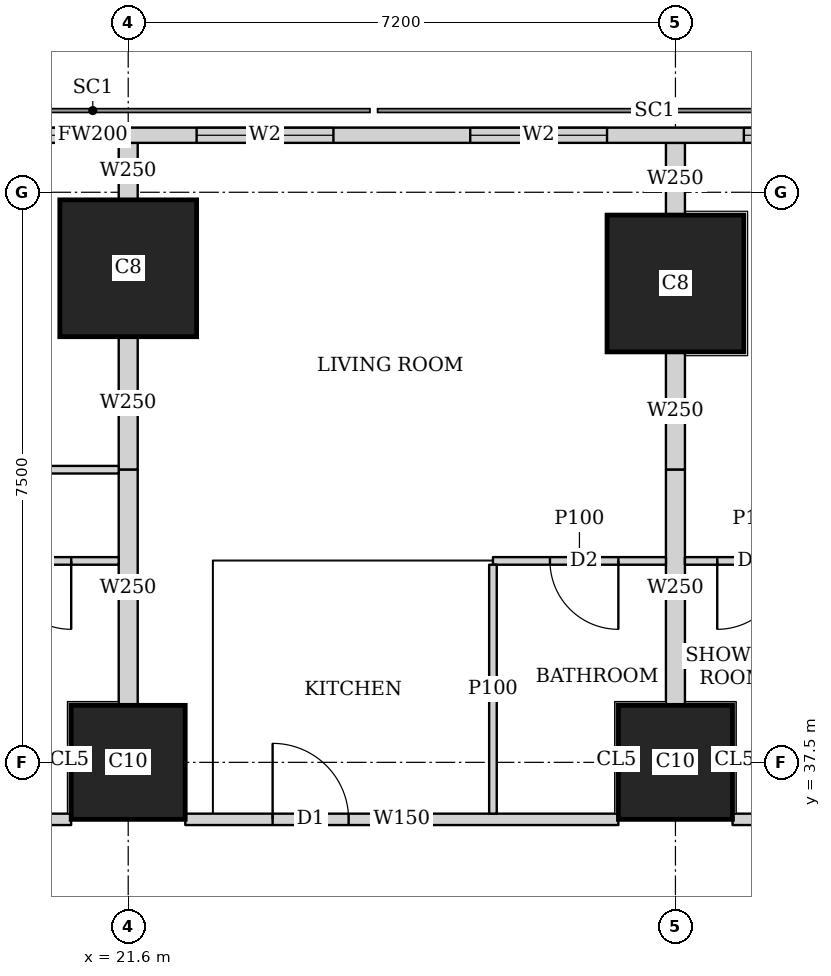
"""IFC4 building model, lengths in metres.
Left out: names, types, materials, properties, quantities, classifications, styles, units other than length and angle.
Written with IfcOpenShell. Run it as: python <this file> out.ifc"""

import sys

from ifc_helpers import new_model, si_unit, direction, frame, frame_2d, origin, origin_2d, place, context, subcontext, project, spatial, rectangle, extrude, element, fill, save


model = new_model("IFC4")
c1 = context("Model", 3, precision=1e-05, world=origin(), true_north=direction((0.0, 1.0)))
c2 = subcontext(c1, "Body", "Model", "MODEL_VIEW")
j1 = project(units=[si_unit("LENGTHUNIT", "METRE"), si_unit("PLANEANGLEUNIT", "RADIAN")], contexts=[c1])
p1 = place(None, origin())
s1 = spatial("IfcSite", under=j1, at=p1, CompositionType="ELEMENT")
p2 = place(p1, origin())
s2 = spatial("IfcBuilding", under=s1, at=p2, CompositionType="ELEMENT")
p3 = place(p2, frame((0.0, 0.0, 169.55)))
s3 = spatial("IfcBuildingStorey", under=s2, at=p3, CompositionType="ELEMENT", Elevation=169.55)
for number, where, z_axis, x_axis in (
    (1, (21.6, 37.5, 0.0), (0.0, 0.0, 1.0), (1.0, 0.0, 0.0)),
    (2, (28.8, 37.5, 0.0), (0.0, 0.0, 1.0), (1.0, 0.0, 0.0)),
):
    element("IfcColumn", number, at=place(p3, frame(where, z_axis=z_axis, x_axis=x_axis)), inside=s3, PredefinedType="COLUMN", context=c2, shape_type="SweptSolid", body=[
        extrude(rectangle(XDim=1.5, YDim=1.5, at=origin_2d()), origin(), (0.0, 0.0, 1.0), 3.75),
    ])
for number, where, z_axis, x_axis in (
    (3, (21.6, 44.0, 0.0), (0.0, 0.0, 1.0), (1.0, 0.0, 0.0)),
    (4, (28.8, 43.8, 0.0), (0.0, 0.0, 1.0), (1.0, 0.0, 0.0)),
):
    element("IfcColumn", number, at=place(p3, frame(where, z_axis=z_axis, x_axis=x_axis)), inside=s3, PredefinedType="COLUMN", context=c2, shape_type="SweptSolid", body=[
        extrude(rectangle(XDim=1.8, YDim=1.8, at=origin_2d()), origin(), (0.0, 0.0, 1.0), 3.75),
    ])
p4 = place(p3, frame((40.106, 45.75, 0.0), z_axis=(0.0, 0.0, 1.0), x_axis=(-1.0, 0.0, 0.0)))
e5 = element("IfcWall", 5, at=p4, inside=s3, PredefinedType="SOLIDWALL", context=c2, shape_type="SweptSolid", body=[
    extrude(rectangle(XDim=37.943, YDim=0.2, at=frame_2d((18.971, 0.0))), origin(), (0.0, 0.0, 1.0), 3.5),
])
p5 = place(p4, frame((8.606, 0.0, 0.9)))
e6 = element("IfcOpeningElement", 6, at=p5, cuts=e5, PredefinedType="OPENING", context=c2, shape_type="SweptSolid", body=[
    extrude(rectangle(XDim=1.8, YDim=1.5, at=frame_2d((0.9, 0.75))), frame((0.0, 0.11, 0.0), z_axis=(0.0, -1.0, 0.0), x_axis=(1.0, 0.0, 0.0)), (0.0, 0.0, 1.0), 0.22),
])
p6 = place(p4, frame((12.206, 0.0, 0.9)))
e7 = element("IfcOpeningElement", 7, at=p6, cuts=e5, PredefinedType="OPENING", context=c2, shape_type="SweptSolid", body=[
    extrude(rectangle(XDim=1.8, YDim=1.5, at=frame_2d((0.9, 0.75))), frame((0.0, 0.11, 0.0), z_axis=(0.0, -1.0, 0.0), x_axis=(1.0, 0.0, 0.0)), (0.0, 0.0, 1.0), 0.22),
])
p7 = place(p4, frame((15.806, 0.0, 0.9)))
e8 = element("IfcOpeningElement", 8, at=p7, cuts=e5, PredefinedType="OPENING", context=c2, shape_type="SweptSolid", body=[
    extrude(rectangle(XDim=1.8, YDim=1.5, at=frame_2d((0.9, 0.75))), frame((0.0, 0.11, 0.0), z_axis=(0.0, -1.0, 0.0), x_axis=(1.0, 0.0, 0.0)), (0.0, 0.0, 1.0), 0.22),
])
p8 = place(p4, frame((19.406, 0.0, 0.9)))
e9 = element("IfcOpeningElement", 9, at=p8, cuts=e5, PredefinedType="OPENING", context=c2, shape_type="SweptSolid", body=[
    extrude(rectangle(XDim=1.8, YDim=1.5, at=frame_2d((0.9, 0.75))), frame((0.0, 0.11, 0.0), z_axis=(0.0, -1.0, 0.0), x_axis=(1.0, 0.0, 0.0)), (0.0, 0.0, 1.0), 0.22),
])
p9 = place(p4, frame((23.006, 0.0, 0.9)))
e10 = element("IfcOpeningElement", 10, at=p9, cuts=e5, PredefinedType="OPENING", context=c2, shape_type="SweptSolid", body=[
    extrude(rectangle(XDim=1.8, YDim=1.5, at=frame_2d((0.9, 0.75))), frame((0.0, 0.11, 0.0), z_axis=(0.0, -1.0, 0.0), x_axis=(1.0, 0.0, 0.0)), (0.0, 0.0, 1.0), 0.22),
])
p10 = place(p4, frame((26.606, 0.0, 0.9)))
e11 = element("IfcOpeningElement", 11, at=p10, cuts=e5, PredefinedType="OPENING", context=c2, shape_type="SweptSolid", body=[
    extrude(rectangle(XDim=1.8, YDim=1.5, at=frame_2d((0.9, 0.75))), frame((0.0, 0.11, 0.0), z_axis=(0.0, -1.0, 0.0), x_axis=(1.0, 0.0, 0.0)), (0.0, 0.0, 1.0), 0.22),
])
p11 = place(p3, frame((15.151, 36.75, 0.0), z_axis=(0.0, 0.0, 1.0), x_axis=(1.0, 0.0, 0.0)))
e12 = element("IfcWall", 12, at=p11, inside=s3, PredefinedType="SOLIDWALL", context=c2, shape_type="SweptSolid", body=[
    extrude(rectangle(XDim=5.698, YDim=0.15, at=frame_2d((2.849, 0.0))), origin(), (0.0, 0.0, 1.0), 3.5),
])
p12 = place(p3, frame((22.351, 36.75, 0.0), z_axis=(0.0, 0.0, 1.0), x_axis=(1.0, 0.0, 0.0)))
e13 = element("IfcWall", 13, at=p12, inside=s3, PredefinedType="SOLIDWALL", context=c2, shape_type="SweptSolid", body=[
    extrude(rectangle(XDim=5.698, YDim=0.15, at=frame_2d((2.849, 0.0))), origin(), (0.0, 0.0, 1.0), 3.5),
])
p13 = place(p12, frame((1.149, 0.0, 0.0)))
e14 = element("IfcOpeningElement", 14, at=p13, cuts=e13, PredefinedType="OPENING", context=c2, shape_type="SweptSolid", body=[
    extrude(rectangle(XDim=1.0, YDim=2.1, at=frame_2d((0.5, 1.05))), frame((0.0, 0.085, 0.0), z_axis=(0.0, -1.0, 0.0), x_axis=(1.0, 0.0, 0.0)), (0.0, 0.0, 1.0), 0.17),
])
p14 = place(p3, frame((29.551, 36.75, 0.0), z_axis=(0.0, 0.0, 1.0), x_axis=(1.0, 0.0, 0.0)))
e15 = element("IfcWall", 15, at=p14, inside=s3, PredefinedType="SOLIDWALL", context=c2, shape_type="SweptSolid", body=[
    extrude(rectangle(XDim=5.422, YDim=0.15, at=frame_2d((2.711, 0.0))), origin(), (0.0, 0.0, 1.0), 3.5),
])
p15 = place(p14, frame((2.895, 0.0, 0.0)))
e16 = element("IfcOpeningElement", 16, at=p15, cuts=e15, PredefinedType="OPENING", context=c2, shape_type="SweptSolid", body=[
    extrude(rectangle(XDim=1.0, YDim=2.1, at=frame_2d((0.5, 1.05))), frame((0.0, 0.085, 0.0), z_axis=(0.0, -1.0, 0.0), x_axis=(1.0, 0.0, 0.0)), (0.0, 0.0, 1.0), 0.17),
])
p16 = place(p3, frame((14.4, 41.35, 0.0), z_axis=(0.0, 0.0, 1.0), x_axis=(1.0, 0.0, 0.0)))
e17 = element("IfcWall", 17, at=p16, inside=s3, PredefinedType="PARTITIONING", context=c2, shape_type="SweptSolid", body=[
    extrude(rectangle(XDim=7.075, YDim=0.1, at=frame_2d((3.538, 0.0))), origin(), (0.0, 0.0, 1.0), 3.5),
])
p17 = place(p16, frame((0.2, 0.0, 0.0)))
e18 = element("IfcOpeningElement", 18, at=p17, cuts=e17, PredefinedType="OPENING", context=c2, shape_type="SweptSolid", body=[
    extrude(rectangle(XDim=0.9, YDim=2.1, at=frame_2d((0.45, 1.05))), frame((0.0, 0.06, 0.0), z_axis=(0.0, -1.0, 0.0), x_axis=(1.0, 0.0, 0.0)), (0.0, 0.0, 1.0), 0.12),
])
p18 = place(p16, frame((3.8, 0.0, 0.0)))
e19 = element("IfcOpeningElement", 19, at=p18, cuts=e17, PredefinedType="OPENING", context=c2, shape_type="SweptSolid", body=[
    extrude(rectangle(XDim=0.9, YDim=2.1, at=frame_2d((0.45, 1.05))), frame((0.0, 0.06, 0.0), z_axis=(0.0, -1.0, 0.0), x_axis=(1.0, 0.0, 0.0)), (0.0, 0.0, 1.0), 0.12),
])
p19 = place(p3, frame((14.4, 40.15, 0.0), z_axis=(0.0, 0.0, 1.0), x_axis=(1.0, 0.0, 0.0)))
e20 = element("IfcWall", 20, at=p19, inside=s3, PredefinedType="PARTITIONING", context=c2, shape_type="SweptSolid", body=[
    extrude(rectangle(XDim=7.075, YDim=0.1, at=frame_2d((3.538, 0.0))), origin(), (0.0, 0.0, 1.0), 3.5),
])
p20 = place(p19, frame((0.655, 0.0, 0.0)))
e21 = element("IfcOpeningElement", 21, at=p20, cuts=e20, PredefinedType="OPENING", context=c2, shape_type="SweptSolid", body=[
    extrude(rectangle(XDim=0.9, YDim=2.1, at=frame_2d((0.45, 1.05))), frame((0.0, 0.06, 0.0), z_axis=(0.0, -1.0, 0.0), x_axis=(1.0, 0.0, 0.0)), (0.0, 0.0, 1.0), 0.12),
])
p21 = place(p19, frame((5.55, 0.0, 0.0)))
e22 = element("IfcOpeningElement", 22, at=p21, cuts=e20, PredefinedType="OPENING", context=c2, shape_type="SweptSolid", body=[
    extrude(rectangle(XDim=0.9, YDim=2.1, at=frame_2d((0.45, 1.05))), frame((0.0, 0.06, 0.0), z_axis=(0.0, -1.0, 0.0), x_axis=(1.0, 0.0, 0.0)), (0.0, 0.0, 1.0), 0.12),
])
p22 = place(p19, frame((3.054, 0.0, 0.0)))
e23 = element("IfcOpeningElement", 23, at=p22, cuts=e20, PredefinedType="OPENING", context=c2, shape_type="SweptSolid", body=[
    extrude(rectangle(XDim=0.9, YDim=2.1, at=frame_2d((0.45, 1.05))), frame((0.0, 0.06, 0.0), z_axis=(0.0, -1.0, 0.0), x_axis=(1.0, 0.0, 0.0)), (0.0, 0.0, 1.0), 0.12),
])
p23 = place(p3, frame((26.399, 40.15, 0.0), z_axis=(0.0, 0.0, 1.0), x_axis=(1.0, 0.0, 0.0)))
e24 = element("IfcWall", 24, at=p23, inside=s3, PredefinedType="PARTITIONING", context=c2, shape_type="SweptSolid", body=[
    extrude(rectangle(XDim=2.276, YDim=0.1, at=frame_2d((1.138, 0.0))), origin(), (0.0, 0.0, 1.0), 3.5),
])
p24 = place(p23, frame((0.75, 0.0, 0.0)))
e25 = element("IfcOpeningElement", 25, at=p24, cuts=e24, PredefinedType="OPENING", context=c2, shape_type="SweptSolid", body=[
    extrude(rectangle(XDim=0.9, YDim=2.1, at=frame_2d((0.45, 1.05))), frame((0.0, 0.06, 0.0), z_axis=(0.0, -1.0, 0.0), x_axis=(1.0, 0.0, 0.0)), (0.0, 0.0, 1.0), 0.12),
])
p25 = place(p3, frame((26.399, 36.825, 0.0), z_axis=(0.0, 0.0, 1.0), x_axis=(0.0, 1.0, 0.0)))
e26 = element("IfcWall", 26, at=p25, inside=s3, PredefinedType="PARTITIONING", context=c2, shape_type="SweptSolid", body=[
    extrude(rectangle(XDim=3.275, YDim=0.1, at=frame_2d((1.638, 0.0))), origin(), (0.0, 0.0, 1.0), 3.5),
])
p26 = place(p3, frame((21.6, 41.35, 0.0), z_axis=(0.0, 0.0, 1.0), x_axis=(0.0, 1.0, 0.0)))
e27 = element("IfcWall", 27, at=p26, inside=s3, PredefinedType="SOLIDWALL", context=c2, shape_type="SweptSolid", body=[
    extrude(rectangle(XDim=1.749, YDim=0.25, at=frame_2d((0.875, 0.0))), origin(), (0.0, 0.0, 1.0), 2.1),
])
p27 = place(p3, frame((21.6, 44.901, 0.0), z_axis=(0.0, 0.0, 1.0), x_axis=(0.0, 1.0, 0.0)))
e28 = element("IfcWall", 28, at=p27, inside=s3, PredefinedType="SOLIDWALL", context=c2, shape_type="SweptSolid", body=[
    extrude(rectangle(XDim=0.749, YDim=0.25, at=frame_2d((0.375, 0.0))), origin(), (0.0, 0.0, 1.0), 2.1),
])
p28 = place(p3, frame((21.6, 38.251, 0.0), z_axis=(0.0, 0.0, 1.0), x_axis=(0.0, 1.0, 0.0)))
e29 = element("IfcWall", 29, at=p28, inside=s3, PredefinedType="SOLIDWALL", context=c2, shape_type="SweptSolid", body=[
    extrude(rectangle(XDim=3.099, YDim=0.25, at=frame_2d((1.55, 0.0))), origin(), (0.0, 0.0, 1.0), 3.5),
])
p29 = place(p3, frame((28.925, 40.15, 0.0), z_axis=(0.0, 0.0, 1.0), x_axis=(1.0, 0.0, 0.0)))
e30 = element("IfcWall", 30, at=p29, inside=s3, PredefinedType="PARTITIONING", context=c2, shape_type="SweptSolid", body=[
    extrude(rectangle(XDim=1.904, YDim=0.1, at=frame_2d((0.952, 0.0))), origin(), (0.0, 0.0, 1.0), 3.5),
])
p30 = place(p29, frame((0.425, 0.0, 0.0)))
e31 = element("IfcOpeningElement", 31, at=p30, cuts=e30, PredefinedType="OPENING", context=c2, shape_type="SweptSolid", body=[
    extrude(rectangle(XDim=0.9, YDim=2.1, at=frame_2d((0.45, 1.05))), frame((0.0, 0.06, 0.0), z_axis=(0.0, -1.0, 0.0), x_axis=(1.0, 0.0, 0.0)), (0.0, 0.0, 1.0), 0.12),
])
p31 = place(p3, frame((28.8, 41.35, 0.0), z_axis=(0.0, 0.0, 1.0), x_axis=(0.0, 1.0, 0.0)))
e32 = element("IfcWall", 32, at=p31, inside=s3, PredefinedType="SOLIDWALL", context=c2, shape_type="SweptSolid", body=[
    extrude(rectangle(XDim=1.549, YDim=0.25, at=frame_2d((0.774, 0.0))), origin(), (0.0, 0.0, 1.0), 2.1),
])
p32 = place(p3, frame((28.8, 44.701, 0.0), z_axis=(0.0, 0.0, 1.0), x_axis=(0.0, 1.0, 0.0)))
e33 = element("IfcWall", 33, at=p32, inside=s3, PredefinedType="SOLIDWALL", context=c2, shape_type="SweptSolid", body=[
    extrude(rectangle(XDim=0.949, YDim=0.25, at=frame_2d((0.475, 0.0))), origin(), (0.0, 0.0, 1.0), 2.1),
])
p33 = place(p3, frame((28.8, 38.251, 0.0), z_axis=(0.0, 0.0, 1.0), x_axis=(0.0, 1.0, 0.0)))
e34 = element("IfcWall", 34, at=p33, inside=s3, PredefinedType="SOLIDWALL", context=c2, shape_type="SweptSolid", body=[
    extrude(rectangle(XDim=3.099, YDim=0.25, at=frame_2d((1.55, 0.0))), origin(), (0.0, 0.0, 1.0), 3.5),
])
p34 = place(p5, origin())
e35 = element("IfcWindow", 35, at=p34, inside=s3, PartitioningType="SINGLE_PANEL", PredefinedType="WINDOW", context=c2, shape_type="SweptSolid", body=[
    extrude(rectangle(XDim=1.8, YDim=1.5, at=frame_2d((0.9, 0.75))), frame((0.0, 0.03, 0.0), z_axis=(0.0, -1.0, 0.0), x_axis=(1.0, 0.0, 0.0)), (0.0, 0.0, 1.0), 0.06),
])
fill(e6, e35)
p35 = place(p6, origin())
e36 = element("IfcWindow", 36, at=p35, inside=s3, PartitioningType="SINGLE_PANEL", PredefinedType="WINDOW", context=c2, shape_type="SweptSolid", body=[
    extrude(rectangle(XDim=1.8, YDim=1.5, at=frame_2d((0.9, 0.75))), frame((0.0, 0.03, 0.0), z_axis=(0.0, -1.0, 0.0), x_axis=(1.0, 0.0, 0.0)), (0.0, 0.0, 1.0), 0.06),
])
fill(e7, e36)
p36 = place(p7, origin())
e37 = element("IfcWindow", 37, at=p36, inside=s3, PartitioningType="SINGLE_PANEL", PredefinedType="WINDOW", context=c2, shape_type="SweptSolid", body=[
    extrude(rectangle(XDim=1.8, YDim=1.5, at=frame_2d((0.9, 0.75))), frame((0.0, 0.03, 0.0), z_axis=(0.0, -1.0, 0.0), x_axis=(1.0, 0.0, 0.0)), (0.0, 0.0, 1.0), 0.06),
])
fill(e8, e37)
p37 = place(p8, origin())
e38 = element("IfcWindow", 38, at=p37, inside=s3, PartitioningType="SINGLE_PANEL", PredefinedType="WINDOW", context=c2, shape_type="SweptSolid", body=[
    extrude(rectangle(XDim=1.8, YDim=1.5, at=frame_2d((0.9, 0.75))), frame((0.0, 0.03, 0.0), z_axis=(0.0, -1.0, 0.0), x_axis=(1.0, 0.0, 0.0)), (0.0, 0.0, 1.0), 0.06),
])
fill(e9, e38)
p38 = place(p21, origin())
e39 = element("IfcDoor", 39, at=p38, inside=s3, OperationType="SINGLE_SWING_LEFT", PredefinedType="DOOR", context=c2, shape_type="SweptSolid", body=[
    extrude(rectangle(XDim=0.9, YDim=2.1, at=frame_2d((0.45, 1.05))), frame((0.0, 0.025, 0.0), z_axis=(0.0, -1.0, 0.0), x_axis=(1.0, 0.0, 0.0)), (0.0, 0.0, 1.0), 0.05),
])
fill(e22, e39)
p39 = place(p24, origin())
e40 = element("IfcDoor", 40, at=p39, inside=s3, OperationType="SINGLE_SWING_LEFT", PredefinedType="DOOR", context=c2, shape_type="SweptSolid", body=[
    extrude(rectangle(XDim=0.9, YDim=2.1, at=frame_2d((0.45, 1.05))), frame((0.0, 0.025, 0.0), z_axis=(0.0, -1.0, 0.0), x_axis=(1.0, 0.0, 0.0)), (0.0, 0.0, 1.0), 0.05),
])
fill(e25, e40)
p40 = place(p13, origin())
e41 = element("IfcDoor", 41, at=p40, inside=s3, OperationType="SINGLE_SWING_LEFT", PredefinedType="DOOR", context=c2, shape_type="SweptSolid", body=[
    extrude(rectangle(XDim=1.0, YDim=2.1, at=frame_2d((0.5, 1.05))), frame((0.0, 0.025, 0.0), z_axis=(0.0, -1.0, 0.0), x_axis=(1.0, 0.0, 0.0)), (0.0, 0.0, 1.0), 0.05),
])
fill(e14, e41)
p41 = place(p30, origin())
e42 = element("IfcDoor", 42, at=p41, inside=s3, OperationType="SINGLE_SWING_RIGHT", PredefinedType="DOOR", context=c2, shape_type="SweptSolid", body=[
    extrude(rectangle(XDim=0.9, YDim=2.1, at=frame_2d((0.45, 1.05))), frame((0.0, 0.025, 0.0), z_axis=(0.0, -1.0, 0.0), x_axis=(1.0, 0.0, 0.0)), (0.0, 0.0, 1.0), 0.05),
])
fill(e31, e42)
save(model, sys.argv[1])
